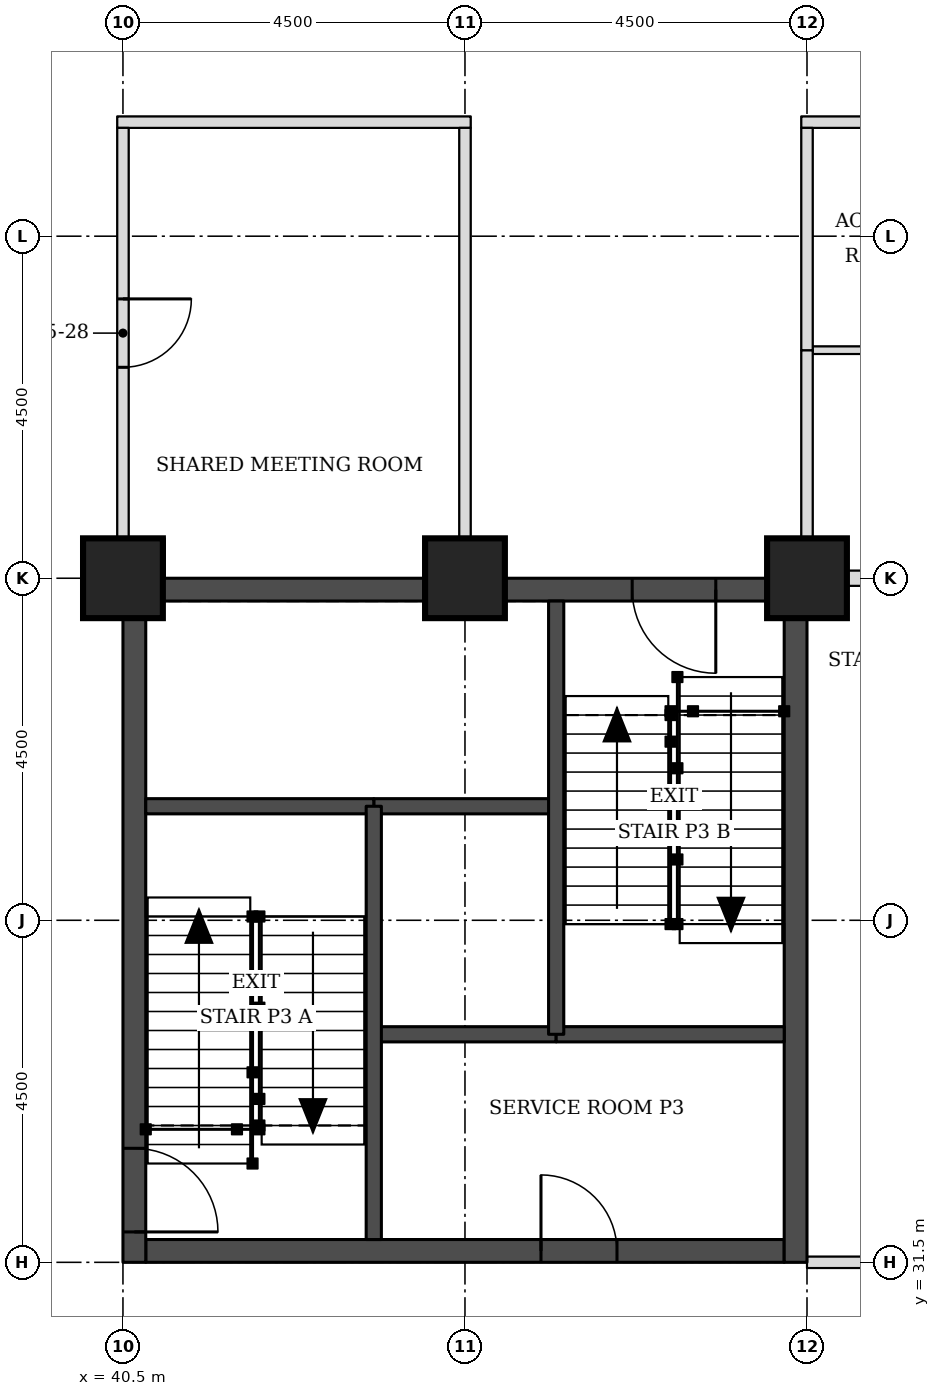
"""IFC4 building model, lengths in metres.
Left out: names, types, materials, properties, quantities, classifications, styles, units other than length and angle.
Written with IfcOpenShell. Run it as: python <this file> out.ifc"""

import sys

from ifc_helpers import new_model, si_unit, direction, frame, frame_2d, origin, origin_2d, place, context, subcontext, project, spatial, rectangle, extrude, element, fill, save


model = new_model("IFC4")
c1 = context("Model", 3, precision=1e-05, world=origin(), true_north=direction((0.0, 1.0)))
c2 = subcontext(c1, "Body", "Model", "MODEL_VIEW")
j1 = project(units=[si_unit("LENGTHUNIT", "METRE"), si_unit("PLANEANGLEUNIT", "RADIAN")], contexts=[c1])
p1 = place(None, origin())
s1 = spatial("IfcSite", under=j1, at=p1, CompositionType="ELEMENT")
p2 = place(p1, origin())
s2 = spatial("IfcBuilding", under=s1, at=p2, CompositionType="ELEMENT")
p3 = place(p2, frame((0.0, 0.0, 112.2)))
s3 = spatial("IfcBuildingStorey", under=s2, at=p3, CompositionType="ELEMENT", Elevation=112.2)
for number, where, z_axis, x_axis in (
    (1, (40.5, 40.5, 0.0), (0.0, 0.0, 1.0), (1.0, 0.0, 0.0)),
    (2, (45.0, 40.5, 0.0), (0.0, 0.0, 1.0), (1.0, 0.0, 0.0)),
    (3, (49.5, 40.5, 0.0), (0.0, 0.0, 1.0), (1.0, 0.0, 0.0)),
):
    element("IfcColumn", number, at=place(p3, frame(where, z_axis=z_axis, x_axis=x_axis)), inside=s3, PredefinedType="COLUMN", context=c2, shape_type="SweptSolid", body=[
        extrude(rectangle(XDim=1.05, YDim=1.05, at=origin_2d()), origin(), (0.0, 0.0, 1.0), 3.7),
    ])
p4 = place(p3, frame((40.8, 31.65, 0.0), z_axis=(0.0, 0.0, 1.0), x_axis=(1.0, 0.0, 0.0)))
e4 = element("IfcWall", 4, at=p4, inside=s3, PredefinedType="SHEAR", context=c2, shape_type="SweptSolid", body=[
    extrude(rectangle(XDim=8.4, YDim=0.3, at=frame_2d((4.2, 0.0))), origin(), (0.0, 0.0, 1.0), 3.7),
])
p5 = place(p4, frame((5.2, 0.0, 0.0)))
e5 = element("IfcOpeningElement", 5, at=p5, cuts=e4, PredefinedType="OPENING", context=c2, shape_type="SweptSolid", body=[
    extrude(rectangle(XDim=1.0, YDim=2.1, at=frame_2d((0.5, 1.05))), frame((0.0, 0.16, 0.0), z_axis=(0.0, -1.0, 0.0), x_axis=(1.0, 0.0, 0.0)), (0.0, 0.0, 1.0), 0.32),
])
p6 = place(p3, frame((40.8, 40.35, 0.0), z_axis=(0.0, 0.0, 1.0), x_axis=(1.0, 0.0, 0.0)))
e6 = element("IfcWall", 6, at=p6, inside=s3, PredefinedType="SHEAR", context=c2, shape_type="SweptSolid", body=[
    extrude(rectangle(XDim=8.4, YDim=0.3, at=frame_2d((4.2, 0.0))), origin(), (0.0, 0.0, 1.0), 3.7),
])
p7 = place(p6, frame((6.4, 0.0, 0.0)))
e7 = element("IfcOpeningElement", 7, at=p7, cuts=e6, PredefinedType="OPENING", context=c2, shape_type="SweptSolid", body=[
    extrude(rectangle(XDim=1.1, YDim=2.1, at=frame_2d((0.55, 1.05))), frame((0.0, 0.16, 0.0), z_axis=(0.0, -1.0, 0.0), x_axis=(1.0, 0.0, 0.0)), (0.0, 0.0, 1.0), 0.32),
])
p8 = place(p3, frame((40.65, 31.5, 0.0), z_axis=(0.0, 0.0, 1.0), x_axis=(0.0, 1.0, 0.0)))
e8 = element("IfcWall", 8, at=p8, inside=s3, PredefinedType="SHEAR", context=c2, shape_type="SweptSolid", body=[
    extrude(rectangle(XDim=9.0, YDim=0.3, at=frame_2d((4.5, 0.0))), origin(), (0.0, 0.0, 1.0), 3.7),
])
p9 = place(p8, frame((0.4, 0.0, 0.0)))
e9 = element("IfcOpeningElement", 9, at=p9, cuts=e8, PredefinedType="OPENING", context=c2, shape_type="SweptSolid", body=[
    extrude(rectangle(XDim=1.1, YDim=2.1, at=frame_2d((0.55, 1.05))), frame((0.0, 0.16, 0.0), z_axis=(0.0, -1.0, 0.0), x_axis=(1.0, 0.0, 0.0)), (0.0, 0.0, 1.0), 0.32),
])
p10 = place(p3, frame((49.35, 31.5, 0.0), z_axis=(0.0, 0.0, 1.0), x_axis=(0.0, 1.0, 0.0)))
e10 = element("IfcWall", 10, at=p10, inside=s3, PredefinedType="SHEAR", context=c2, shape_type="SweptSolid", body=[
    extrude(rectangle(XDim=9.0, YDim=0.3, at=frame_2d((4.5, 0.0))), origin(), (0.0, 0.0, 1.0), 3.7),
])
p11 = place(p3, frame((49.5, 31.5, 0.0), z_axis=(0.0, 0.0, 1.0), x_axis=(1.0, 0.0, 0.0)))
e11 = element("IfcWall", 11, at=p11, inside=s3, PredefinedType="PARTITIONING", context=c2, shape_type="SweptSolid", body=[
    extrude(rectangle(XDim=4.5, YDim=0.15, at=frame_2d((2.25, 0.0))), origin(), (0.0, 0.0, 1.0), 2.55),
])
p12 = place(p11, frame((1.75, 0.0, 0.0)))
e12 = element("IfcOpeningElement", 12, at=p12, cuts=e11, PredefinedType="OPENING", context=c2, shape_type="SweptSolid", body=[
    extrude(rectangle(XDim=1.0, YDim=2.1, at=frame_2d((0.5, 1.05))), frame((0.0, 0.085, 0.0), z_axis=(0.0, -1.0, 0.0), x_axis=(1.0, 0.0, 0.0)), (0.0, 0.0, 1.0), 0.17),
])
p13 = place(p3, frame((50.015, 40.5, 0.0), z_axis=(0.0, 0.0, 1.0), x_axis=(1.0, 0.0, 0.0)))
e13 = element("IfcWall", 13, at=p13, inside=s3, PredefinedType="PARTITIONING", context=c2, shape_type="SweptSolid", body=[
    extrude(rectangle(XDim=3.46, YDim=0.2, at=frame_2d((1.73, 0.0))), origin(), (0.0, 0.0, 1.0), 2.8),
])
p14 = place(p3, frame((49.575, 43.5, 0.0), z_axis=(0.0, 0.0, 1.0), x_axis=(1.0, 0.0, 0.0)))
e14 = element("IfcWall", 14, at=p14, inside=s3, PredefinedType="PARTITIONING", context=c2, shape_type="SweptSolid", body=[
    extrude(rectangle(XDim=4.375, YDim=0.1, at=frame_2d((2.188, 0.0))), origin(), (0.0, 0.0, 1.0), 3.55),
])
p15 = place(p14, frame((1.75, 0.0, 0.0)))
e15 = element("IfcOpeningElement", 15, at=p15, cuts=e14, PredefinedType="OPENING", context=c2, shape_type="SweptSolid", body=[
    extrude(rectangle(XDim=0.9, YDim=2.1, at=frame_2d((0.45, 1.05))), frame((0.0, 0.06, 0.0), z_axis=(0.0, -1.0, 0.0), x_axis=(1.0, 0.0, 0.0)), (0.0, 0.0, 1.0), 0.12),
])
p16 = place(p3, frame((40.425, 46.5, 0.0), z_axis=(0.0, 0.0, 1.0), x_axis=(1.0, 0.0, 0.0)))
e16 = element("IfcWall", 16, at=p16, inside=s3, PredefinedType="PARTITIONING", context=c2, shape_type="SweptSolid", body=[
    extrude(rectangle(XDim=4.65, YDim=0.15, at=frame_2d((2.325, 0.0))), origin(), (0.0, 0.0, 1.0), 3.55),
])
p17 = place(p3, frame((49.425, 46.5, 0.0), z_axis=(0.0, 0.0, 1.0), x_axis=(1.0, 0.0, 0.0)))
e17 = element("IfcWall", 17, at=p17, inside=s3, PredefinedType="PARTITIONING", context=c2, shape_type="SweptSolid", body=[
    extrude(rectangle(XDim=4.575, YDim=0.15, at=frame_2d((2.288, 0.0))), origin(), (0.0, 0.0, 1.0), 3.55),
])
p18 = place(p17, frame((1.8, 0.0, 0.0)))
e18 = element("IfcOpeningElement", 18, at=p18, cuts=e17, PredefinedType="OPENING", context=c2, shape_type="SweptSolid", body=[
    extrude(rectangle(XDim=1.0, YDim=2.1, at=frame_2d((0.5, 1.05))), frame((0.0, 0.085, 0.0), z_axis=(0.0, -1.0, 0.0), x_axis=(1.0, 0.0, 0.0)), (0.0, 0.0, 1.0), 0.17),
])
p19 = place(p3, frame((40.5, 41.025, 0.0), z_axis=(0.0, 0.0, 1.0), x_axis=(0.0, 1.0, 0.0)))
e19 = element("IfcWall", 19, at=p19, inside=s3, PredefinedType="PARTITIONING", context=c2, shape_type="SweptSolid", body=[
    extrude(rectangle(XDim=5.4, YDim=0.15, at=frame_2d((2.7, 0.0))), origin(), (0.0, 0.0, 1.0), 3.55),
])
p20 = place(p19, frame((2.25, 0.0, 0.0)))
e20 = element("IfcOpeningElement", 20, at=p20, cuts=e19, PredefinedType="OPENING", context=c2, shape_type="SweptSolid", body=[
    extrude(rectangle(XDim=0.9, YDim=2.1, at=frame_2d((0.45, 1.05))), frame((0.0, 0.085, 0.0), z_axis=(0.0, -1.0, 0.0), x_axis=(1.0, 0.0, 0.0)), (0.0, 0.0, 1.0), 0.17),
])
p21 = place(p3, frame((45.0, 41.025, 0.0), z_axis=(0.0, 0.0, 1.0), x_axis=(0.0, 1.0, 0.0)))
e21 = element("IfcWall", 21, at=p21, inside=s3, PredefinedType="PARTITIONING", context=c2, shape_type="SweptSolid", body=[
    extrude(rectangle(XDim=5.4, YDim=0.15, at=frame_2d((2.7, 0.0))), origin(), (0.0, 0.0, 1.0), 3.55),
])
p22 = place(p3, frame((49.5, 41.025, 0.0), z_axis=(0.0, 0.0, 1.0), x_axis=(0.0, 1.0, 0.0)))
e22 = element("IfcWall", 22, at=p22, inside=s3, PredefinedType="PARTITIONING", context=c2, shape_type="SweptSolid", body=[
    extrude(rectangle(XDim=2.475, YDim=0.15, at=frame_2d((1.238, 0.0))), origin(), (0.0, 0.0, 1.0), 3.55),
])
p23 = place(p3, frame((49.5, 43.5, 0.0), z_axis=(0.0, 0.0, 1.0), x_axis=(0.0, 1.0, 0.0)))
e23 = element("IfcWall", 23, at=p23, inside=s3, PredefinedType="PARTITIONING", context=c2, shape_type="SweptSolid", body=[
    extrude(rectangle(XDim=2.925, YDim=0.15, at=frame_2d((1.462, 0.0))), origin(), (0.0, 0.0, 1.0), 3.55),
])
p24 = place(p3, frame((43.8, 34.5, 0.0), z_axis=(0.0, 0.0, 1.0), x_axis=(1.0, 0.0, 0.0)))
e24 = element("IfcWall", 24, at=p24, inside=s3, PredefinedType="SOLIDWALL", context=c2, shape_type="SweptSolid", body=[
    extrude(rectangle(XDim=2.4, YDim=0.2, at=frame_2d((1.2, 0.0))), origin(), (0.0, 0.0, 1.0), 3.55),
])
p25 = place(p3, frame((46.2, 34.5, 0.0), z_axis=(0.0, 0.0, 1.0), x_axis=(1.0, 0.0, 0.0)))
e25 = element("IfcWall", 25, at=p25, inside=s3, PredefinedType="SOLIDWALL", context=c2, shape_type="SweptSolid", body=[
    extrude(rectangle(XDim=3.0, YDim=0.2, at=frame_2d((1.5, 0.0))), origin(), (0.0, 0.0, 1.0), 3.55),
])
p26 = place(p3, frame((43.8, 37.5, 0.0), z_axis=(0.0, 0.0, 1.0), x_axis=(1.0, 0.0, 0.0)))
e26 = element("IfcWall", 26, at=p26, inside=s3, PredefinedType="SOLIDWALL", context=c2, shape_type="SweptSolid", body=[
    extrude(rectangle(XDim=2.4, YDim=0.2, at=frame_2d((1.2, 0.0))), origin(), (0.0, 0.0, 1.0), 3.7),
])
p27 = place(p3, frame((40.8, 37.5, 0.0), z_axis=(0.0, 0.0, 1.0), x_axis=(1.0, 0.0, 0.0)))
e27 = element("IfcWall", 27, at=p27, inside=s3, PredefinedType="SOLIDWALL", context=c2, shape_type="SweptSolid", body=[
    extrude(rectangle(XDim=3.0, YDim=0.2, at=frame_2d((1.5, 0.0))), origin(), (0.0, 0.0, 1.0), 3.55),
])
for number, where, z_axis, x_axis in (
    (28, (43.8, 31.8, 0.0), (0.0, 0.0, 1.0), (0.0, 1.0, 0.0)),
    (29, (46.2, 34.5, 0.0), (0.0, 0.0, 1.0), (0.0, 1.0, 0.0)),
):
    element("IfcWall", number, at=place(p3, frame(where, z_axis=z_axis, x_axis=x_axis)), inside=s3, PredefinedType="SOLIDWALL", context=c2, shape_type="SweptSolid", body=[
        extrude(rectangle(XDim=5.7, YDim=0.2, at=frame_2d((2.85, 0.0))), origin(), (0.0, 0.0, 1.0), 3.55),
    ])
p28 = place(p20, frame((0.9, 0.0, 0.0), z_axis=(0.0, 0.0, 1.0), x_axis=(-1.0, 0.0, 0.0)))
e30 = element("IfcDoor", 30, at=p28, inside=s3, OperationType="SINGLE_SWING_LEFT", PredefinedType="DOOR", context=c2, shape_type="SweptSolid", body=[
    extrude(rectangle(XDim=0.9, YDim=2.1, at=frame_2d((0.45, 1.05))), frame((0.0, 0.025, 0.0), z_axis=(0.0, -1.0, 0.0), x_axis=(1.0, 0.0, 0.0)), (0.0, 0.0, 1.0), 0.05),
])
fill(e20, e30)
p29 = place(p9, frame((1.1, 0.0, 0.0), z_axis=(0.0, 0.0, 1.0), x_axis=(-1.0, 0.0, 0.0)))
e31 = element("IfcDoor", 31, at=p29, inside=s3, OperationType="SINGLE_SWING_RIGHT", PredefinedType="DOOR", context=c2, shape_type="SweptSolid", body=[
    extrude(rectangle(XDim=1.1, YDim=2.1, at=frame_2d((0.55, 1.05))), frame((0.0, 0.025, 0.0), z_axis=(0.0, -1.0, 0.0), x_axis=(1.0, 0.0, 0.0)), (0.0, 0.0, 1.0), 0.05),
])
fill(e9, e31)
p30 = place(p7, frame((1.1, 0.0, 0.0), z_axis=(0.0, 0.0, 1.0), x_axis=(-1.0, 0.0, 0.0)))
e32 = element("IfcDoor", 32, at=p30, inside=s3, OperationType="SINGLE_SWING_LEFT", PredefinedType="DOOR", context=c2, shape_type="SweptSolid", body=[
    extrude(rectangle(XDim=1.1, YDim=2.1, at=frame_2d((0.55, 1.05))), frame((0.0, 0.025, 0.0), z_axis=(0.0, -1.0, 0.0), x_axis=(1.0, 0.0, 0.0)), (0.0, 0.0, 1.0), 0.05),
])
fill(e7, e32)
p31 = place(p5, origin())
e33 = element("IfcDoor", 33, at=p31, inside=s3, OperationType="SINGLE_SWING_LEFT", PredefinedType="DOOR", context=c2, shape_type="SweptSolid", body=[
    extrude(rectangle(XDim=1.0, YDim=2.1, at=frame_2d((0.5, 1.05))), frame((0.0, 0.025, 0.0), z_axis=(0.0, -1.0, 0.0), x_axis=(1.0, 0.0, 0.0)), (0.0, 0.0, 1.0), 0.05),
])
fill(e5, e33)
save(model, sys.argv[1])
